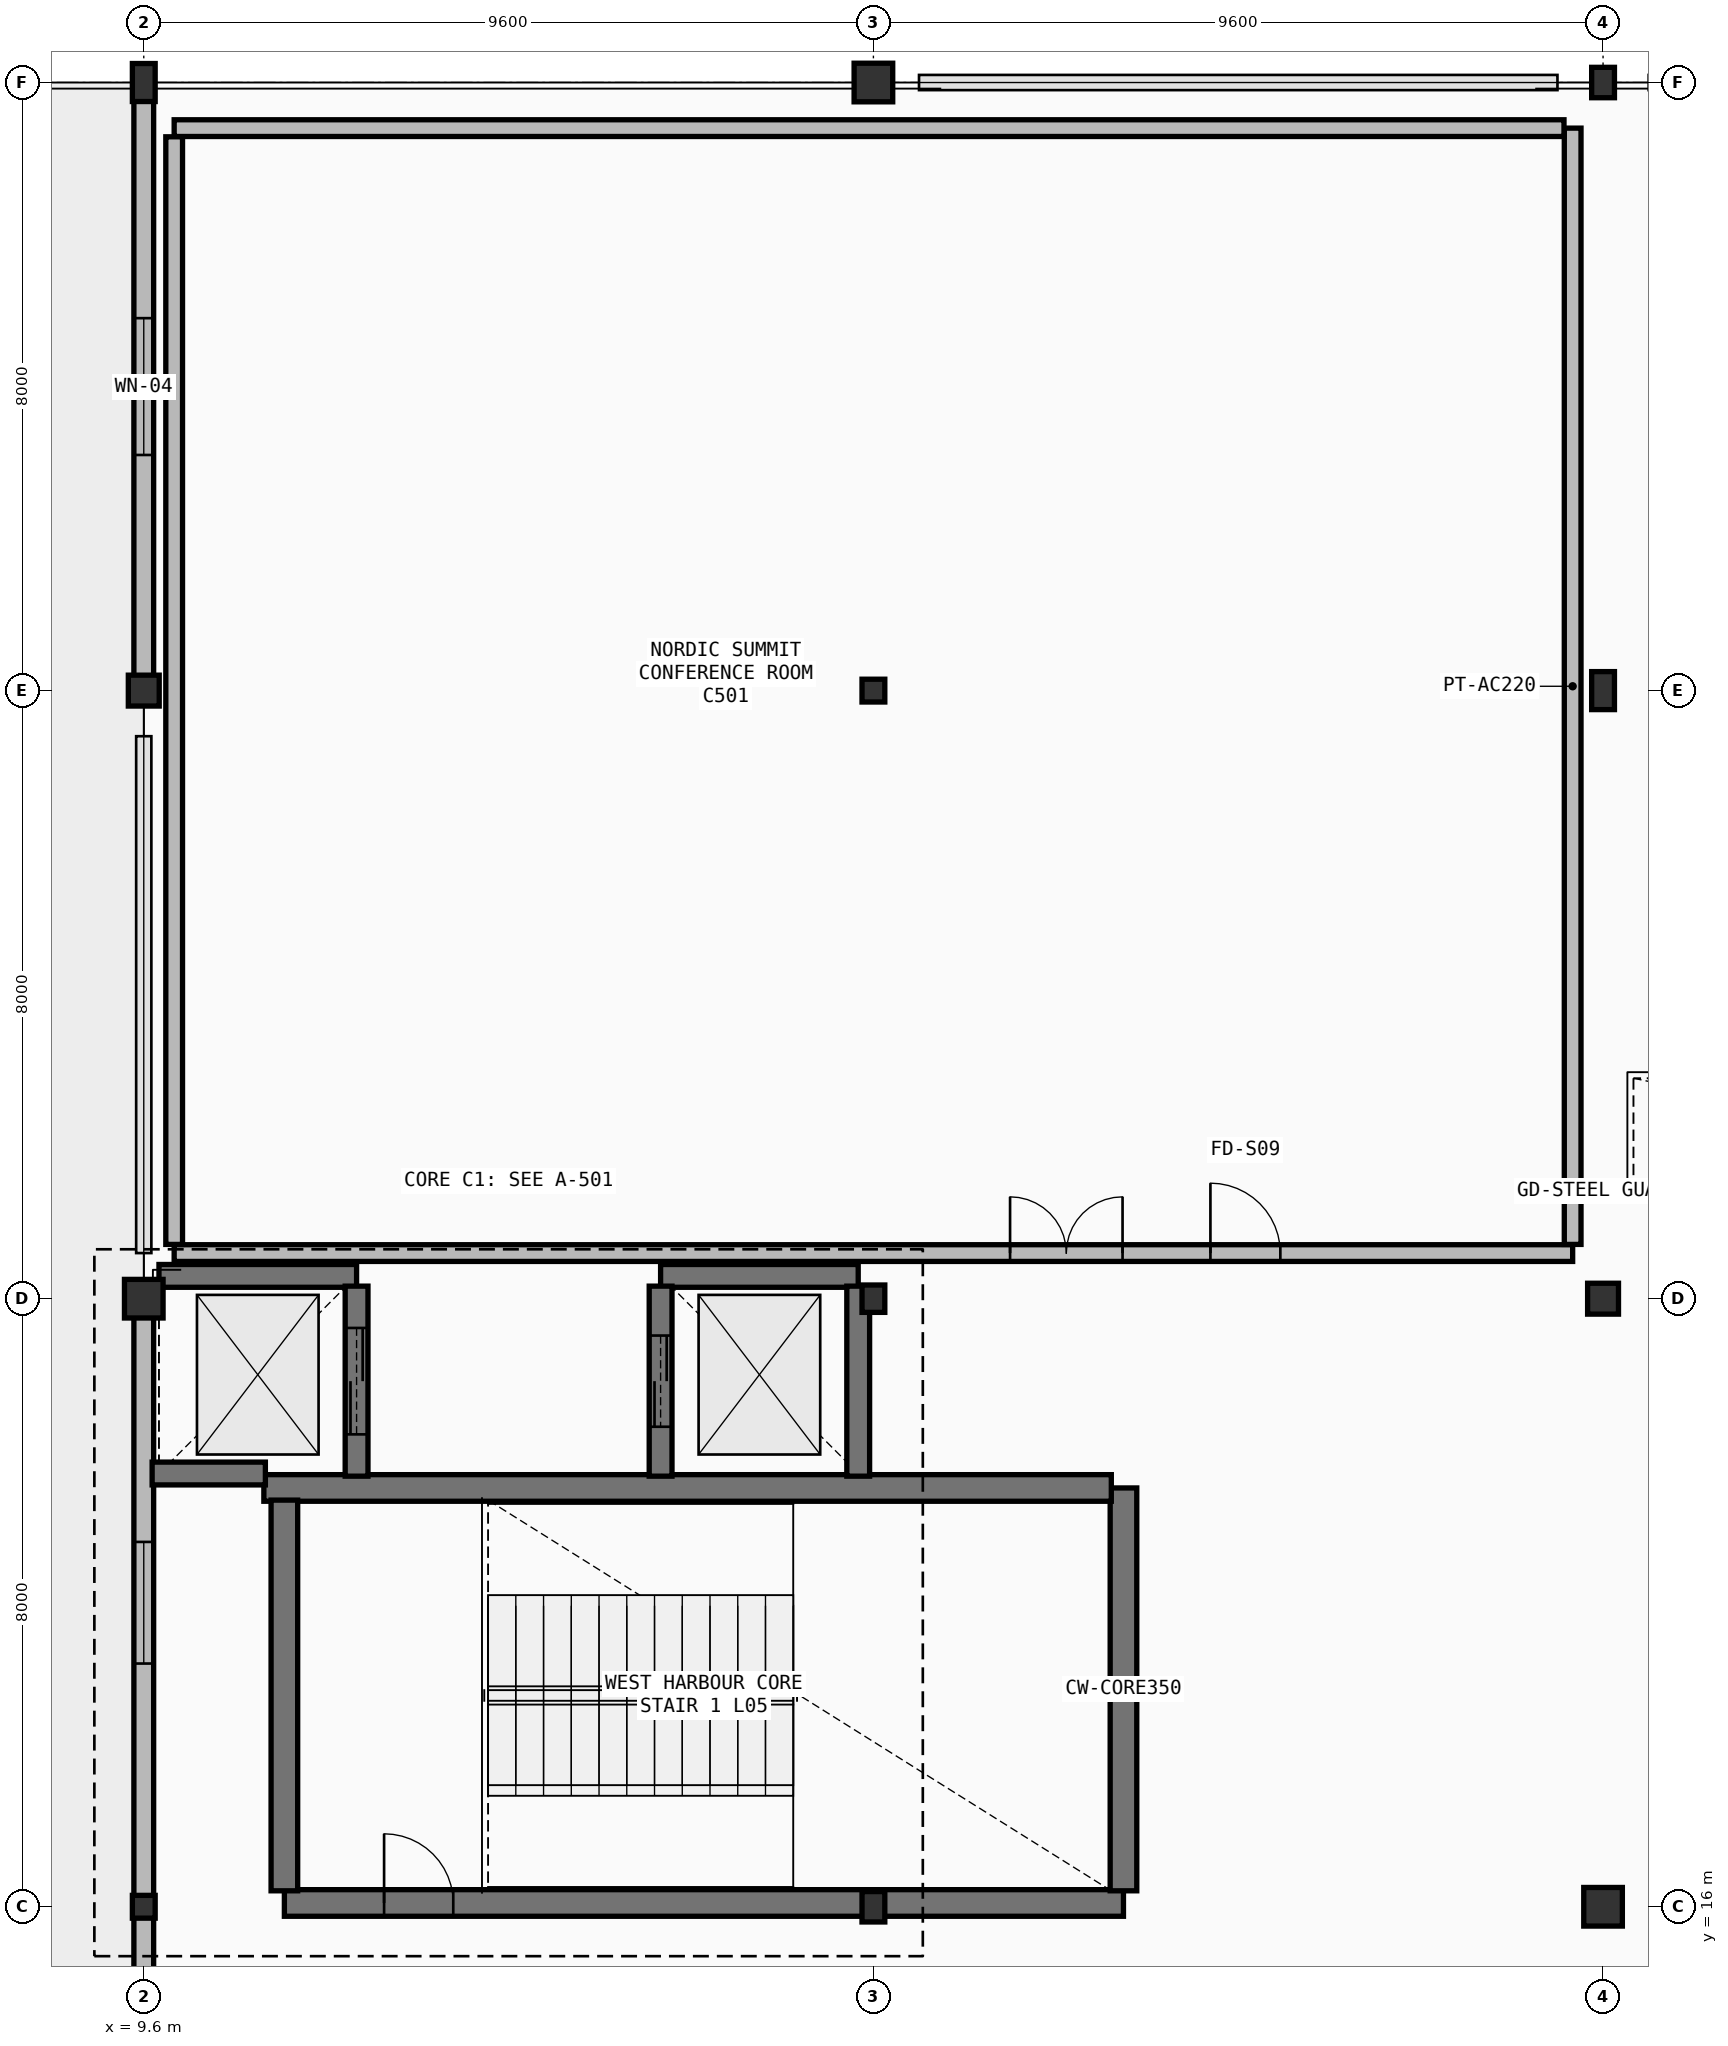
"""IFC4 building model, lengths in metres.
Left out: names, types, materials, properties, quantities, classifications, styles, units other than length and angle.
Written with IfcOpenShell. Run it as: python <this file> out.ifc"""

import sys

from ifc_helpers import new_model, si_unit, direction, frame, frame_2d, origin, origin_2d, place, context, subcontext, project, spatial, rectangle, hollow_circle, i_section, extrude, element, fill, save


model = new_model("IFC4")
c1 = context("Model", 3, precision=1e-05, world=origin(), true_north=direction((0.0, 1.0)))
c2 = subcontext(c1, "Body", "Model", "MODEL_VIEW")
j1 = project(units=[si_unit("LENGTHUNIT", "METRE"), si_unit("PLANEANGLEUNIT", "RADIAN")], contexts=[c1])
p1 = place(None, origin())
s1 = spatial("IfcSite", under=j1, at=p1, CompositionType="ELEMENT")
p2 = place(p1, origin())
s2 = spatial("IfcBuilding", under=s1, at=p2, CompositionType="ELEMENT")
p3 = place(p2, frame((0.0, 0.0, 24.9)))
s3 = spatial("IfcBuildingStorey", under=s2, at=p3, CompositionType="ELEMENT", Elevation=24.9)
p4 = place(p3, frame((9.6, 16.0, 0.0), z_axis=(0.0, 0.0, 1.0), x_axis=(1.0, 0.0, 0.0)))
e1 = element("IfcColumn", 1, at=p4, inside=s3, PredefinedType="COLUMN", context=c2, shape_type="SweptSolid", body=[
    extrude(i_section(OverallWidth=0.3, OverallDepth=0.3, WebThickness=0.011, FlangeThickness=0.019, FilletRadius=0.027, at=origin_2d()), origin(), (0.0, 0.0, 1.0), 4.5),
])
p5 = place(p3, frame((9.6, 24.0, 0.0), z_axis=(0.0, 0.0, 1.0), x_axis=(1.0, 0.0, 0.0)))
e2 = element("IfcColumn", 2, at=p5, inside=s3, PredefinedType="COLUMN", context=c2, shape_type="SweptSolid", body=[
    extrude(hollow_circle(Radius=0.254, WallThickness=0.025, at=origin_2d()), origin(), (0.0, 0.0, 1.0), 4.5),
])
p6 = place(p3, frame((9.6, 32.0, 0.0), z_axis=(0.0, 0.0, 1.0), x_axis=(1.0, 0.0, 0.0)))
e3 = element("IfcColumn", 3, at=p6, inside=s3, PredefinedType="COLUMN", context=c2, shape_type="SweptSolid", body=[
    extrude(hollow_circle(Radius=0.203, WallThickness=0.02, at=origin_2d()), origin(), (0.0, 0.0, 1.0), 4.5),
])
p7 = place(p3, frame((9.6, 40.0, 0.0), z_axis=(0.0, 0.0, 1.0), x_axis=(1.0, 0.0, 0.0)))
e4 = element("IfcColumn", 4, at=p7, inside=s3, PredefinedType="COLUMN", context=c2, shape_type="SweptSolid", body=[
    extrude(i_section(OverallWidth=0.3, OverallDepth=0.5, WebThickness=0.014, FlangeThickness=0.028, FilletRadius=0.027, at=origin_2d()), origin(), (0.0, 0.0, 1.0), 4.5),
])
p8 = place(p3, frame((19.2, 16.0, 0.0), z_axis=(0.0, 0.0, 1.0), x_axis=(1.0, 0.0, 0.0)))
e5 = element("IfcColumn", 5, at=p8, inside=s3, PredefinedType="COLUMN", context=c2, shape_type="SweptSolid", body=[
    extrude(i_section(OverallWidth=0.3, OverallDepth=0.4, WebThickness=0.013, FlangeThickness=0.024, FilletRadius=0.027, at=origin_2d()), origin(), (0.0, 0.0, 1.0), 4.5),
])
p9 = place(p3, frame((19.2, 24.0, 0.0), z_axis=(0.0, 0.0, 1.0), x_axis=(1.0, 0.0, 0.0)))
e6 = element("IfcColumn", 6, at=p9, inside=s3, PredefinedType="COLUMN", context=c2, shape_type="SweptSolid", body=[
    extrude(i_section(OverallWidth=0.3, OverallDepth=0.36, WebThickness=0.012, FlangeThickness=0.022, FilletRadius=0.027, at=origin_2d()), origin(), (0.0, 0.0, 1.0), 4.5),
])
p10 = place(p3, frame((19.2, 32.0, 0.0), z_axis=(0.0, 0.0, 1.0), x_axis=(1.0, 0.0, 0.0)))
e7 = element("IfcColumn", 7, at=p10, inside=s3, PredefinedType="COLUMN", context=c2, shape_type="SweptSolid", body=[
    extrude(i_section(OverallWidth=0.3, OverallDepth=0.3, WebThickness=0.011, FlangeThickness=0.019, FilletRadius=0.027, at=origin_2d()), origin(), (0.0, 0.0, 1.0), 4.5),
])
for number, where, z_axis, x_axis in (
    (8, (19.2, 40.0, 0.0), (0.0, 0.0, 1.0), (1.0, 0.0, 0.0)),
    (9, (28.8, 16.0, 0.0), (0.0, 0.0, 1.0), (1.0, 0.0, 0.0)),
):
    element("IfcColumn", number, at=place(p3, frame(where, z_axis=z_axis, x_axis=x_axis)), inside=s3, PredefinedType="COLUMN", context=c2, shape_type="SweptSolid", body=[
        extrude(hollow_circle(Radius=0.254, WallThickness=0.025, at=origin_2d()), origin(), (0.0, 0.0, 1.0), 4.5),
    ])
p11 = place(p3, frame((28.8, 24.0, 0.0), z_axis=(0.0, 0.0, 1.0), x_axis=(1.0, 0.0, 0.0)))
e10 = element("IfcColumn", 10, at=p11, inside=s3, PredefinedType="COLUMN", context=c2, shape_type="SweptSolid", body=[
    extrude(hollow_circle(Radius=0.203, WallThickness=0.02, at=origin_2d()), origin(), (0.0, 0.0, 1.0), 4.5),
])
p12 = place(p3, frame((28.8, 32.0, 0.0), z_axis=(0.0, 0.0, 1.0), x_axis=(1.0, 0.0, 0.0)))
e11 = element("IfcColumn", 11, at=p12, inside=s3, PredefinedType="COLUMN", context=c2, shape_type="SweptSolid", body=[
    extrude(i_section(OverallWidth=0.3, OverallDepth=0.5, WebThickness=0.014, FlangeThickness=0.028, FilletRadius=0.027, at=origin_2d()), origin(), (0.0, 0.0, 1.0), 4.5),
])
p13 = place(p3, frame((28.8, 40.0, 0.0), z_axis=(0.0, 0.0, 1.0), x_axis=(1.0, 0.0, 0.0)))
e12 = element("IfcColumn", 12, at=p13, inside=s3, PredefinedType="COLUMN", context=c2, shape_type="SweptSolid", body=[
    extrude(i_section(OverallWidth=0.3, OverallDepth=0.4, WebThickness=0.013, FlangeThickness=0.024, FilletRadius=0.027, at=origin_2d()), origin(), (0.0, 0.0, 1.0), 4.5),
])
p14 = place(p3, frame((9.6, 10.8, 0.0), z_axis=(0.0, 0.0, 1.0), x_axis=(0.0, 1.0, 0.0)))
e13 = element("IfcWall", 13, at=p14, inside=s3, PredefinedType="STANDARD", context=c2, shape_type="SweptSolid", body=[
    extrude(rectangle(XDim=5.2, YDim=0.26, at=frame_2d((2.6, 0.0))), origin(), (0.0, 0.0, 1.0), 4.26),
])
p15 = place(p14, frame((1.9, 0.0, 0.9)))
e14 = element("IfcOpeningElement", 14, at=p15, cuts=e13, PredefinedType="OPENING", context=c2, shape_type="SweptSolid", body=[
    extrude(rectangle(XDim=1.4, YDim=1.9, at=frame_2d((0.7, 0.95))), frame((0.0, 0.14, 0.0), z_axis=(0.0, -1.0, 0.0), x_axis=(1.0, 0.0, 0.0)), (0.0, 0.0, 1.0), 0.28),
])
p16 = place(p3, frame((9.6, 16.0, 0.0), z_axis=(0.0, 0.0, 1.0), x_axis=(0.0, 1.0, 0.0)))
e15 = element("IfcWall", 15, at=p16, inside=s3, PredefinedType="STANDARD", context=c2, shape_type="SweptSolid", body=[
    extrude(rectangle(XDim=8.0, YDim=0.26, at=frame_2d((4.0, 0.0))), origin(), (0.0, 0.0, 1.0), 3.79),
])
p17 = place(p16, frame((3.2, 0.0, 0.9)))
e16 = element("IfcOpeningElement", 16, at=p17, cuts=e15, PredefinedType="OPENING", context=c2, shape_type="SweptSolid", body=[
    extrude(rectangle(XDim=1.6, YDim=2.0, at=frame_2d((0.8, 1.0))), frame((0.0, 0.14, 0.0), z_axis=(0.0, -1.0, 0.0), x_axis=(1.0, 0.0, 0.0)), (0.0, 0.0, 1.0), 0.28),
])
p18 = place(p3, frame((9.6, 32.0, 0.0), z_axis=(0.0, 0.0, 1.0), x_axis=(0.0, 1.0, 0.0)))
e17 = element("IfcWall", 17, at=p18, inside=s3, PredefinedType="STANDARD", context=c2, shape_type="SweptSolid", body=[
    extrude(rectangle(XDim=8.0, YDim=0.26, at=frame_2d((4.0, 0.0))), origin(), (0.0, 0.0, 1.0), 3.78),
])
p19 = place(p18, frame((3.1, 0.0, 0.9)))
e18 = element("IfcOpeningElement", 18, at=p19, cuts=e17, PredefinedType="OPENING", context=c2, shape_type="SweptSolid", body=[
    extrude(rectangle(XDim=1.8, YDim=2.1, at=frame_2d((0.9, 1.05))), frame((0.0, 0.14, 0.0), z_axis=(0.0, -1.0, 0.0), x_axis=(1.0, 0.0, 0.0)), (0.0, 0.0, 1.0), 0.28),
])
p20 = place(p3, frame((11.45, 16.05, 0.0), z_axis=(0.0, 0.0, 1.0), x_axis=(1.0, 0.0, 0.0)))
e19 = element("IfcWall", 19, at=p20, inside=s3, PredefinedType="SHEAR", context=c2, shape_type="SweptSolid", body=[
    extrude(rectangle(XDim=11.04, YDim=0.35, at=frame_2d((5.52, 0.0))), origin(), (0.0, 0.0, 1.0), 4.27),
])
p21 = place(p20, frame((1.312, 0.0, 0.0)))
e20 = element("IfcOpeningElement", 20, at=p21, cuts=e19, PredefinedType="OPENING", context=c2, shape_type="SweptSolid", body=[
    extrude(rectangle(XDim=0.91, YDim=2.08, at=frame_2d((0.455, 1.04))), frame((0.0, 0.185, 0.0), z_axis=(0.0, -1.0, 0.0), x_axis=(1.0, 0.0, 0.0)), (0.0, 0.0, 1.0), 0.37),
])
p22 = place(p3, frame((22.49, 16.21, 0.0), z_axis=(0.0, 0.0, 1.0), x_axis=(0.0, 1.0, 0.0)))
e21 = element("IfcWall", 21, at=p22, inside=s3, PredefinedType="SHEAR", context=c2, shape_type="SweptSolid", body=[
    extrude(rectangle(XDim=5.3, YDim=0.35, at=frame_2d((2.65, 0.0))), origin(), (0.0, 0.0, 1.0), 4.27),
])
p23 = place(p3, frame((22.33, 21.51, 0.0), z_axis=(0.0, 0.0, 1.0), x_axis=(-1.0, 0.0, 0.0)))
e22 = element("IfcWall", 22, at=p23, inside=s3, PredefinedType="SHEAR", context=c2, shape_type="SweptSolid", body=[
    extrude(rectangle(XDim=11.15, YDim=0.35, at=frame_2d((5.575, 0.0))), origin(), (0.0, 0.0, 1.0), 4.27),
])
p24 = place(p3, frame((11.45, 21.35, 0.0), z_axis=(0.0, 0.0, 1.0), x_axis=(0.0, -1.0, 0.0)))
e23 = element("IfcWall", 23, at=p24, inside=s3, PredefinedType="SHEAR", context=c2, shape_type="SweptSolid", body=[
    extrude(rectangle(XDim=5.14, YDim=0.35, at=frame_2d((2.57, 0.0))), origin(), (0.0, 0.0, 1.0), 4.27),
])
p25 = place(p3, frame((12.4, 24.3, 0.0), z_axis=(0.0, 0.0, 1.0), x_axis=(-1.0, 0.0, 0.0)))
e24 = element("IfcWall", 24, at=p25, inside=s3, PredefinedType="SHEAR", context=c2, shape_type="SweptSolid", body=[
    extrude(rectangle(XDim=2.6, YDim=0.3, at=frame_2d((1.3, 0.0))), origin(), (0.0, 0.0, 1.0), 4.26),
])
p26 = place(p3, frame((9.71, 21.7, 0.0), z_axis=(0.0, 0.0, 1.0), x_axis=(1.0, 0.0, 0.0)))
e25 = element("IfcWall", 25, at=p26, inside=s3, PredefinedType="SHEAR", context=c2, shape_type="SweptSolid", body=[
    extrude(rectangle(XDim=1.49, YDim=0.3, at=frame_2d((0.745, 0.0))), origin(), (0.0, 0.0, 1.0), 4.27),
])
p27 = place(p3, frame((12.4, 21.665, 0.0), z_axis=(0.0, 0.0, 1.0), x_axis=(0.0, 1.0, 0.0)))
e26 = element("IfcWall", 26, at=p27, inside=s3, PredefinedType="SHEAR", context=c2, shape_type="SweptSolid", body=[
    extrude(rectangle(XDim=2.5, YDim=0.3, at=frame_2d((1.25, 0.0))), origin(), (0.0, 0.0, 1.0), 4.26),
])
p28 = place(p27, frame((0.55, 0.0, 0.0)))
e27 = element("IfcOpeningElement", 27, at=p28, cuts=e26, PredefinedType="OPENING", context=c2, shape_type="SweptSolid", body=[
    extrude(rectangle(XDim=1.4, YDim=2.26, at=frame_2d((0.7, 1.13))), frame((0.0, 0.16, 0.0), z_axis=(0.0, -1.0, 0.0), x_axis=(1.0, 0.0, 0.0)), (0.0, 0.0, 1.0), 0.32),
])
p29 = place(p3, frame((19.0, 24.3, 0.0), z_axis=(0.0, 0.0, 1.0), x_axis=(-1.0, 0.0, 0.0)))
e28 = element("IfcWall", 28, at=p29, inside=s3, PredefinedType="SHEAR", context=c2, shape_type="SweptSolid", body=[
    extrude(rectangle(XDim=2.6, YDim=0.3, at=frame_2d((1.3, 0.0))), origin(), (0.0, 0.0, 1.0), 4.26),
])
p30 = place(p3, frame((19.0, 21.665, 0.0), z_axis=(0.0, 0.0, 1.0), x_axis=(0.0, 1.0, 0.0)))
e29 = element("IfcWall", 29, at=p30, inside=s3, PredefinedType="SHEAR", context=c2, shape_type="SweptSolid", body=[
    extrude(rectangle(XDim=2.5, YDim=0.3, at=frame_2d((1.25, 0.0))), origin(), (0.0, 0.0, 1.0), 4.26),
])
p31 = place(p3, frame((16.4, 24.165, 0.0), z_axis=(0.0, 0.0, 1.0), x_axis=(0.0, -1.0, 0.0)))
e30 = element("IfcWall", 30, at=p31, inside=s3, PredefinedType="SHEAR", context=c2, shape_type="SweptSolid", body=[
    extrude(rectangle(XDim=2.5, YDim=0.3, at=frame_2d((1.25, 0.0))), origin(), (0.0, 0.0, 1.0), 4.26),
])
p32 = place(p31, frame((0.65, 0.0, 0.0)))
e31 = element("IfcOpeningElement", 31, at=p32, cuts=e30, PredefinedType="OPENING", context=c2, shape_type="SweptSolid", body=[
    extrude(rectangle(XDim=1.2, YDim=2.2, at=frame_2d((0.6, 1.1))), frame((0.0, 0.16, 0.0), z_axis=(0.0, -1.0, 0.0), x_axis=(1.0, 0.0, 0.0)), (0.0, 0.0, 1.0), 0.32),
])
p33 = place(p3, frame((10.0, 24.6, 0.0), z_axis=(0.0, 0.0, 1.0), x_axis=(1.0, 0.0, 0.0)))
e32 = element("IfcWall", 32, at=p33, inside=s3, PredefinedType="PARTITIONING", context=c2, shape_type="SweptSolid", body=[
    extrude(rectangle(XDim=18.4, YDim=0.22, at=frame_2d((9.2, 0.0))), origin(), (0.0, 0.0, 1.0), 3.33),
])
p34 = place(p33, frame((10.998, 0.0, 0.0)))
e33 = element("IfcOpeningElement", 33, at=p34, cuts=e32, PredefinedType="OPENING", context=c2, shape_type="SweptSolid", body=[
    extrude(rectangle(XDim=1.48, YDim=2.16, at=frame_2d((0.74, 1.08))), frame((0.0, 0.12, 0.0), z_axis=(0.0, -1.0, 0.0), x_axis=(1.0, 0.0, 0.0)), (0.0, 0.0, 1.0), 0.24),
])
p35 = place(p33, frame((13.634, 0.0, 0.0)))
e34 = element("IfcOpeningElement", 34, at=p35, cuts=e32, PredefinedType="OPENING", context=c2, shape_type="SweptSolid", body=[
    extrude(rectangle(XDim=0.92, YDim=2.15, at=frame_2d((0.46, 1.075))), frame((0.0, 0.12, 0.0), z_axis=(0.0, -1.0, 0.0), x_axis=(1.0, 0.0, 0.0)), (0.0, 0.0, 1.0), 0.24),
])
p36 = place(p3, frame((28.4, 24.714, 0.0), z_axis=(0.0, 0.0, 1.0), x_axis=(0.0, 1.0, 0.0)))
e35 = element("IfcWall", 35, at=p36, inside=s3, PredefinedType="PARTITIONING", context=c2, shape_type="SweptSolid", body=[
    extrude(rectangle(XDim=14.686, YDim=0.22, at=frame_2d((7.343, 0.0))), origin(), (0.0, 0.0, 1.0), 3.53),
])
p37 = place(p3, frame((28.286, 39.4, 0.0), z_axis=(0.0, 0.0, 1.0), x_axis=(-1.0, 0.0, 0.0)))
e36 = element("IfcWall", 36, at=p37, inside=s3, PredefinedType="PARTITIONING", context=c2, shape_type="SweptSolid", body=[
    extrude(rectangle(XDim=18.286, YDim=0.22, at=frame_2d((9.143, 0.0))), origin(), (0.0, 0.0, 1.0), 3.53),
])
p38 = place(p3, frame((10.0, 39.286, 0.0), z_axis=(0.0, 0.0, 1.0), x_axis=(0.0, -1.0, 0.0)))
e37 = element("IfcWall", 37, at=p38, inside=s3, PredefinedType="PARTITIONING", context=c2, shape_type="SweptSolid", body=[
    extrude(rectangle(XDim=14.572, YDim=0.22, at=frame_2d((7.286, 0.0))), origin(), (0.0, 0.0, 1.0), 3.43),
])
p39 = place(p17, origin())
e38 = element("IfcWindow", 38, at=p39, inside=s3, PartitioningType="SINGLE_PANEL", PredefinedType="WINDOW", context=c2, shape_type="SweptSolid", body=[
    extrude(rectangle(XDim=1.6, YDim=2.0, at=frame_2d((0.8, 1.0))), frame((0.0, 0.03, 0.0), z_axis=(0.0, -1.0, 0.0), x_axis=(1.0, 0.0, 0.0)), (0.0, 0.0, 1.0), 0.06),
])
fill(e16, e38)
p40 = place(p19, origin())
e39 = element("IfcWindow", 39, at=p40, inside=s3, PartitioningType="SINGLE_PANEL", PredefinedType="WINDOW", context=c2, shape_type="SweptSolid", body=[
    extrude(rectangle(XDim=1.8, YDim=2.1, at=frame_2d((0.9, 1.05))), frame((0.0, 0.03, 0.0), z_axis=(0.0, -1.0, 0.0), x_axis=(1.0, 0.0, 0.0)), (0.0, 0.0, 1.0), 0.06),
])
fill(e18, e39)
p41 = place(p21, origin())
e40 = element("IfcDoor", 40, at=p41, inside=s3, OperationType="SINGLE_SWING_LEFT", PredefinedType="DOOR", context=c2, shape_type="SweptSolid", body=[
    extrude(rectangle(XDim=0.91, YDim=2.08, at=frame_2d((0.455, 1.04))), frame((0.0, 0.025, 0.0), z_axis=(0.0, -1.0, 0.0), x_axis=(1.0, 0.0, 0.0)), (0.0, 0.0, 1.0), 0.05),
])
fill(e20, e40)
p42 = place(p28, origin())
e41 = element("IfcDoor", 41, at=p42, inside=s3, OperationType="DOUBLE_DOOR_SLIDING", PredefinedType="DOOR", context=c2, shape_type="SweptSolid", body=[
    extrude(rectangle(XDim=1.4, YDim=2.26, at=frame_2d((0.7, 1.13))), frame((0.0, 0.025, 0.0), z_axis=(0.0, -1.0, 0.0), x_axis=(1.0, 0.0, 0.0)), (0.0, 0.0, 1.0), 0.05),
])
fill(e27, e41)
p43 = place(p32, origin())
e42 = element("IfcDoor", 42, at=p43, inside=s3, OperationType="DOUBLE_DOOR_SLIDING", PredefinedType="DOOR", context=c2, shape_type="SweptSolid", body=[
    extrude(rectangle(XDim=1.2, YDim=2.2, at=frame_2d((0.6, 1.1))), frame((0.0, 0.025, 0.0), z_axis=(0.0, -1.0, 0.0), x_axis=(1.0, 0.0, 0.0)), (0.0, 0.0, 1.0), 0.05),
])
fill(e31, e42)
p44 = place(p34, origin())
e43 = element("IfcDoor", 43, at=p44, inside=s3, OperationType="DOUBLE_DOOR_SINGLE_SWING", PredefinedType="DOOR", context=c2, shape_type="SweptSolid", body=[
    extrude(rectangle(XDim=1.48, YDim=2.16, at=frame_2d((0.74, 1.08))), frame((0.0, 0.025, 0.0), z_axis=(0.0, -1.0, 0.0), x_axis=(1.0, 0.0, 0.0)), (0.0, 0.0, 1.0), 0.05),
])
fill(e33, e43)
p45 = place(p35, origin())
e44 = element("IfcDoor", 44, at=p45, inside=s3, OperationType="SINGLE_SWING_RIGHT", PredefinedType="DOOR", context=c2, shape_type="SweptSolid", body=[
    extrude(rectangle(XDim=0.92, YDim=2.15, at=frame_2d((0.46, 1.075))), frame((0.0, 0.025, 0.0), z_axis=(0.0, -1.0, 0.0), x_axis=(1.0, 0.0, 0.0)), (0.0, 0.0, 1.0), 0.05),
])
fill(e34, e44)
save(model, sys.argv[1])
